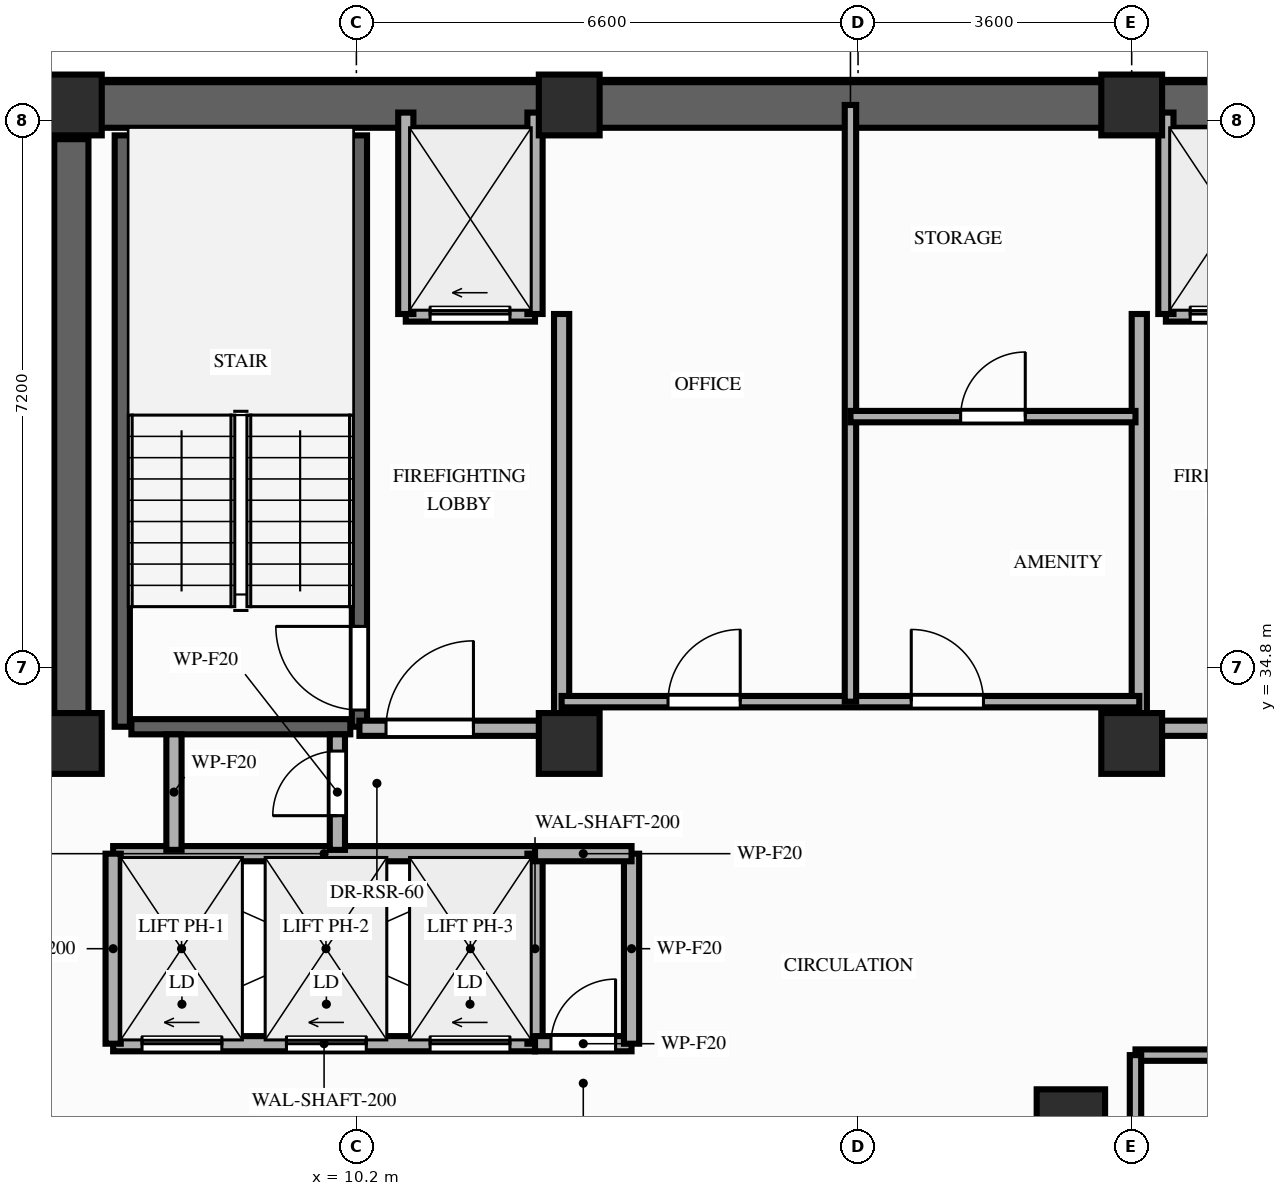
"""IFC4 building model, lengths in metres.
Left out: names, types, materials, properties, quantities, classifications, styles, units other than length and angle.
Written with IfcOpenShell. Run it as: python <this file> out.ifc"""

import sys

from ifc_helpers import new_model, si_unit, direction, frame, frame_2d, origin, origin_2d, place, context, subcontext, project, spatial, rectangle, extrude, element, fill, save


model = new_model("IFC4")
c1 = context("Model", 3, precision=1e-05, world=origin(), true_north=direction((0.0, 1.0)))
c2 = subcontext(c1, "Body", "Model", "MODEL_VIEW")
j1 = project(units=[si_unit("LENGTHUNIT", "METRE"), si_unit("PLANEANGLEUNIT", "RADIAN")], contexts=[c1])
p1 = place(None, origin())
s1 = spatial("IfcSite", under=j1, at=p1, CompositionType="ELEMENT")
p2 = place(p1, origin())
s2 = spatial("IfcBuilding", under=s1, at=p2, CompositionType="ELEMENT")
p3 = place(p2, frame((0.0, 0.0, 198.4)))
s3 = spatial("IfcBuildingStorey", under=s2, at=p3, CompositionType="ELEMENT", Elevation=198.4)
for number, where, z_axis, x_axis in (
    (1, (6.45, 33.8, 0.0), (0.0, 0.0, 1.0), (1.0, 0.0, 0.0)),
    (2, (13.0, 33.8, 0.0), (0.0, 0.0, 1.0), (1.0, 0.0, 0.0)),
    (3, (20.4, 33.8, 0.0), (0.0, 0.0, 1.0), (1.0, 0.0, 0.0)),
    (4, (6.45, 42.2, 0.0), (0.0, 0.0, 1.0), (1.0, 0.0, 0.0)),
    (5, (13.0, 42.2, 0.0), (0.0, 0.0, 1.0), (1.0, 0.0, 0.0)),
    (6, (20.4, 42.2, 0.0), (0.0, 0.0, 1.0), (1.0, 0.0, 0.0)),
):
    element("IfcColumn", number, at=place(p3, frame(where, z_axis=z_axis, x_axis=x_axis)), inside=s3, PredefinedType="COLUMN", context=c2, shape_type="SweptSolid", body=[
        extrude(rectangle(XDim=0.8, YDim=0.8, at=origin_2d()), origin(), (0.0, 0.0, 1.0), 3.2),
    ])
p4 = place(p3, frame((19.6, 28.8, 0.0), z_axis=(0.0, 0.0, 1.0), x_axis=(1.0, 0.0, 0.0)))
e7 = element("IfcColumn", 7, at=p4, inside=s3, PredefinedType="COLUMN", context=c2, shape_type="SweptSolid", body=[
    extrude(rectangle(XDim=0.9, YDim=0.9, at=origin_2d()), origin(), (0.0, 0.0, 1.0), 3.2),
])
p5 = place(p3, frame((6.45, 42.2, 0.0), z_axis=(0.0, 0.0, 1.0), x_axis=(1.0, 0.0, 0.0)))
e8 = element("IfcWall", 8, at=p5, inside=s3, PredefinedType="SHEAR", context=c2, shape_type="SweptSolid", body=[
    extrude(rectangle(XDim=20.45, YDim=0.6, at=frame_2d((10.225, 0.0))), origin(), (0.0, 0.0, 1.0), 3.02),
])
p6 = place(p3, frame((6.45, 33.8, 0.0), z_axis=(0.0, 0.0, 1.0), x_axis=(0.0, 1.0, 0.0)))
e9 = element("IfcWall", 9, at=p6, inside=s3, PredefinedType="SHEAR", context=c2, shape_type="SweptSolid", body=[
    extrude(rectangle(XDim=7.95, YDim=0.45, at=frame_2d((3.975, 0.0))), origin(), (0.0, 0.0, 1.0), 3.02),
])
p7 = place(p3, frame((7.12, 34.02, 0.0), z_axis=(0.0, 0.0, 1.0), x_axis=(0.0, 1.0, 0.0)))
e10 = element("IfcWall", 10, at=p7, inside=s3, PredefinedType="SHEAR", context=c2, shape_type="SweptSolid", body=[
    extrude(rectangle(XDim=7.78, YDim=0.2, at=frame_2d((3.89, 0.0))), origin(), (0.0, 0.0, 1.0), 3.02),
])
p8 = place(p3, frame((10.24, 34.02, 0.0), z_axis=(0.0, 0.0, 1.0), x_axis=(0.0, 1.0, 0.0)))
e11 = element("IfcWall", 11, at=p8, inside=s3, PredefinedType="SHEAR", context=c2, shape_type="SweptSolid", body=[
    extrude(rectangle(XDim=7.78, YDim=0.2, at=frame_2d((3.89, 0.0))), origin(), (0.0, 0.0, 1.0), 3.02),
])
p9 = place(p8, frame((0.22, 0.0, 0.0)))
e12 = element("IfcOpeningElement", 12, at=p9, cuts=e11, PredefinedType="OPENING", context=c2, shape_type="SweptSolid", body=[
    extrude(rectangle(XDim=1.1, YDim=2.15, at=frame_2d((0.55, 1.075))), frame((0.0, 0.11, 0.0), z_axis=(0.0, -1.0, 0.0), x_axis=(1.0, 0.0, 0.0)), (0.0, 0.0, 1.0), 0.22),
])
p10 = place(p3, frame((7.24, 34.02, 0.0), z_axis=(0.0, 0.0, 1.0), x_axis=(1.0, 0.0, 0.0)))
e13 = element("IfcWall", 13, at=p10, inside=s3, PredefinedType="SHEAR", context=c2, shape_type="SweptSolid", body=[
    extrude(rectangle(XDim=2.88, YDim=0.2, at=frame_2d((1.44, 0.0))), origin(), (0.0, 0.0, 1.0), 3.02),
])
p11 = place(p3, frame((7.0, 29.85, 0.0), z_axis=(0.0, 0.0, 1.0), x_axis=(1.0, 0.0, 0.0)))
e14 = element("IfcWall", 14, at=p11, inside=s3, PredefinedType="MOVABLE", context=c2, shape_type="SweptSolid", body=[
    extrude(rectangle(XDim=5.55, YDim=0.2, at=frame_2d((2.775, 0.0))), origin(), (0.0, 0.0, 1.0), 3.02),
])
p12 = place(p11, frame((0.38, 0.0, 0.0)))
e15 = element("IfcOpeningElement", 15, at=p12, cuts=e14, PredefinedType="OPENING", context=c2, shape_type="SweptSolid", body=[
    extrude(rectangle(XDim=1.05, YDim=2.15, at=frame_2d((0.525, 1.075))), frame((0.0, 0.11, 0.0), z_axis=(0.0, -1.0, 0.0), x_axis=(1.0, 0.0, 0.0)), (0.0, 0.0, 1.0), 0.22),
])
p13 = place(p11, frame((2.28, 0.0, 0.0)))
e16 = element("IfcOpeningElement", 16, at=p13, cuts=e14, PredefinedType="OPENING", context=c2, shape_type="SweptSolid", body=[
    extrude(rectangle(XDim=1.05, YDim=2.15, at=frame_2d((0.525, 1.075))), frame((0.0, 0.11, 0.0), z_axis=(0.0, -1.0, 0.0), x_axis=(1.0, 0.0, 0.0)), (0.0, 0.0, 1.0), 0.22),
])
p14 = place(p11, frame((4.17, 0.0, 0.0)))
e17 = element("IfcOpeningElement", 17, at=p14, cuts=e14, PredefinedType="OPENING", context=c2, shape_type="SweptSolid", body=[
    extrude(rectangle(XDim=1.05, YDim=2.15, at=frame_2d((0.525, 1.075))), frame((0.0, 0.11, 0.0), z_axis=(0.0, -1.0, 0.0), x_axis=(1.0, 0.0, 0.0)), (0.0, 0.0, 1.0), 0.22),
])
p15 = place(p3, frame((7.0, 32.35, 0.0), z_axis=(0.0, 0.0, 1.0), x_axis=(1.0, 0.0, 0.0)))
e18 = element("IfcWall", 18, at=p15, inside=s3, PredefinedType="MOVABLE", context=c2, shape_type="SweptSolid", body=[
    extrude(rectangle(XDim=5.55, YDim=0.2, at=frame_2d((2.775, 0.0))), origin(), (0.0, 0.0, 1.0), 3.02),
])
for number, where, z_axis, x_axis in (
    (19, (7.0, 29.85, 0.0), (0.0, 0.0, 1.0), (0.0, 1.0, 0.0)),
    (20, (12.55, 29.85, 0.0), (0.0, 0.0, 1.0), (0.0, 1.0, 0.0)),
):
    element("IfcWall", number, at=place(p3, frame(where, z_axis=z_axis, x_axis=x_axis)), inside=s3, PredefinedType="MOVABLE", context=c2, shape_type="SweptSolid", body=[
        extrude(rectangle(XDim=2.5, YDim=0.2, at=frame_2d((1.25, 0.0))), origin(), (0.0, 0.0, 1.0), 3.02),
    ])
p16 = place(p3, frame((10.85, 39.45, 0.0), z_axis=(0.0, 0.0, 1.0), x_axis=(1.0, 0.0, 0.0)))
e21 = element("IfcWall", 21, at=p16, inside=s3, PredefinedType="MOVABLE", context=c2, shape_type="SweptSolid", body=[
    extrude(rectangle(XDim=1.7, YDim=0.2, at=frame_2d((0.85, 0.0))), origin(), (0.0, 0.0, 1.0), 3.02),
])
p17 = place(p16, frame((0.32, 0.0, 0.0)))
e22 = element("IfcOpeningElement", 22, at=p17, cuts=e21, PredefinedType="OPENING", context=c2, shape_type="SweptSolid", body=[
    extrude(rectangle(XDim=1.05, YDim=2.15, at=frame_2d((0.525, 1.075))), frame((0.0, 0.11, 0.0), z_axis=(0.0, -1.0, 0.0), x_axis=(1.0, 0.0, 0.0)), (0.0, 0.0, 1.0), 0.22),
])
p18 = place(p3, frame((20.85, 39.45, 0.0), z_axis=(0.0, 0.0, 1.0), x_axis=(1.0, 0.0, 0.0)))
e23 = element("IfcWall", 23, at=p18, inside=s3, PredefinedType="MOVABLE", context=c2, shape_type="SweptSolid", body=[
    extrude(rectangle(XDim=1.7, YDim=0.2, at=frame_2d((0.85, 0.0))), origin(), (0.0, 0.0, 1.0), 3.02),
])
p19 = place(p18, frame((0.32, 0.0, 0.0)))
e24 = element("IfcOpeningElement", 24, at=p19, cuts=e23, PredefinedType="OPENING", context=c2, shape_type="SweptSolid", body=[
    extrude(rectangle(XDim=1.05, YDim=2.15, at=frame_2d((0.525, 1.075))), frame((0.0, 0.11, 0.0), z_axis=(0.0, -1.0, 0.0), x_axis=(1.0, 0.0, 0.0)), (0.0, 0.0, 1.0), 0.22),
])
for number, where, z_axis, x_axis in (
    (25, (10.85, 39.45, 0.0), (0.0, 0.0, 1.0), (0.0, 1.0, 0.0)),
    (26, (12.55, 39.45, 0.0), (0.0, 0.0, 1.0), (0.0, 1.0, 0.0)),
):
    element("IfcWall", number, at=place(p3, frame(where, z_axis=z_axis, x_axis=x_axis)), inside=s3, PredefinedType="MOVABLE", context=c2, shape_type="SweptSolid", body=[
        extrude(rectangle(XDim=2.65, YDim=0.2, at=frame_2d((1.325, 0.0))), origin(), (0.0, 0.0, 1.0), 2.51),
    ])
p20 = place(p3, frame((12.9, 34.0, 0.0), z_axis=(0.0, 0.0, 1.0), x_axis=(0.0, 1.0, 0.0)))
e27 = element("IfcWall", 27, at=p20, inside=s3, PredefinedType="PARTITIONING", context=c2, shape_type="SweptSolid", body=[
    extrude(rectangle(XDim=5.45, YDim=0.2, at=frame_2d((2.725, 0.0))), origin(), (0.0, 0.0, 1.0), 2.51),
])
p21 = place(p3, frame((10.24, 34.0, 0.0), z_axis=(0.0, 0.0, 1.0), x_axis=(1.0, 0.0, 0.0)))
e28 = element("IfcWall", 28, at=p21, inside=s3, PredefinedType="PARTITIONING", context=c2, shape_type="SweptSolid", body=[
    extrude(rectangle(XDim=2.66, YDim=0.2, at=frame_2d((1.33, 0.0))), origin(), (0.0, 0.0, 1.0), 2.51),
])
p22 = place(p21, frame((0.35, 0.0, 0.0)))
e29 = element("IfcOpeningElement", 29, at=p22, cuts=e28, PredefinedType="OPENING", context=c2, shape_type="SweptSolid", body=[
    extrude(rectangle(XDim=1.15, YDim=2.15, at=frame_2d((0.575, 1.075))), frame((0.0, 0.11, 0.0), z_axis=(0.0, -1.0, 0.0), x_axis=(1.0, 0.0, 0.0)), (0.0, 0.0, 1.0), 0.22),
])
p23 = place(p3, frame((20.85, 39.45, 0.0), z_axis=(0.0, 0.0, 1.0), x_axis=(0.0, 1.0, 0.0)))
e30 = element("IfcWall", 30, at=p23, inside=s3, PredefinedType="MOVABLE", context=c2, shape_type="SweptSolid", body=[
    extrude(rectangle(XDim=2.65, YDim=0.2, at=frame_2d((1.325, 0.0))), origin(), (0.0, 0.0, 1.0), 2.51),
])
p24 = place(p3, frame((20.5, 34.0, 0.0), z_axis=(0.0, 0.0, 1.0), x_axis=(0.0, 1.0, 0.0)))
e31 = element("IfcWall", 31, at=p24, inside=s3, PredefinedType="PARTITIONING", context=c2, shape_type="SweptSolid", body=[
    extrude(rectangle(XDim=5.45, YDim=0.2, at=frame_2d((2.725, 0.0))), origin(), (0.0, 0.0, 1.0), 2.51),
])
p25 = place(p3, frame((20.5, 34.0, 0.0), z_axis=(0.0, 0.0, 1.0), x_axis=(1.0, 0.0, 0.0)))
e32 = element("IfcWall", 32, at=p25, inside=s3, PredefinedType="PARTITIONING", context=c2, shape_type="SweptSolid", body=[
    extrude(rectangle(XDim=2.6, YDim=0.2, at=frame_2d((1.3, 0.0))), origin(), (0.0, 0.0, 1.0), 2.51),
])
p26 = place(p25, frame((1.05, 0.0, 0.0)))
e33 = element("IfcOpeningElement", 33, at=p26, cuts=e32, PredefinedType="OPENING", context=c2, shape_type="SweptSolid", body=[
    extrude(rectangle(XDim=1.15, YDim=2.15, at=frame_2d((0.575, 1.075))), frame((0.0, 0.11, 0.0), z_axis=(0.0, -1.0, 0.0), x_axis=(1.0, 0.0, 0.0)), (0.0, 0.0, 1.0), 0.22),
])
p27 = place(p3, frame((12.55, 29.85, 0.0), z_axis=(0.0, 0.0, 1.0), x_axis=(1.0, 0.0, 0.0)))
e34 = element("IfcWall", 34, at=p27, inside=s3, PredefinedType="PARTITIONING", context=c2, shape_type="SweptSolid", body=[
    extrude(rectangle(XDim=1.27, YDim=0.2, at=frame_2d((0.635, 0.0))), origin(), (0.0, 0.0, 1.0), 3.02),
])
p28 = place(p27, frame((0.21, 0.0, 0.0)))
e35 = element("IfcOpeningElement", 35, at=p28, cuts=e34, PredefinedType="OPENING", context=c2, shape_type="SweptSolid", body=[
    extrude(rectangle(XDim=0.85, YDim=2.05, at=frame_2d((0.425, 1.025))), frame((0.0, 0.11, 0.0), z_axis=(0.0, -1.0, 0.0), x_axis=(1.0, 0.0, 0.0)), (0.0, 0.0, 1.0), 0.22),
])
p29 = place(p3, frame((13.82, 29.85, 0.0), z_axis=(0.0, 0.0, 1.0), x_axis=(0.0, 1.0, 0.0)))
e36 = element("IfcWall", 36, at=p29, inside=s3, PredefinedType="PARTITIONING", context=c2, shape_type="SweptSolid", body=[
    extrude(rectangle(XDim=2.5, YDim=0.2, at=frame_2d((1.25, 0.0))), origin(), (0.0, 0.0, 1.0), 3.02),
])
p30 = place(p3, frame((12.55, 32.35, 0.0), z_axis=(0.0, 0.0, 1.0), x_axis=(1.0, 0.0, 0.0)))
e37 = element("IfcWall", 37, at=p30, inside=s3, PredefinedType="PARTITIONING", context=c2, shape_type="SweptSolid", body=[
    extrude(rectangle(XDim=1.27, YDim=0.2, at=frame_2d((0.635, 0.0))), origin(), (0.0, 0.0, 1.0), 3.02),
])
p31 = place(p3, frame((7.8, 32.4, 0.0), z_axis=(0.0, 0.0, 1.0), x_axis=(0.0, 1.0, 0.0)))
e38 = element("IfcWall", 38, at=p31, inside=s3, PredefinedType="PARTITIONING", context=c2, shape_type="SweptSolid", body=[
    extrude(rectangle(XDim=1.52, YDim=0.2, at=frame_2d((0.76, 0.0))), origin(), (0.0, 0.0, 1.0), 2.51),
])
p32 = place(p3, frame((9.95, 32.4, 0.0), z_axis=(0.0, 0.0, 1.0), x_axis=(0.0, 1.0, 0.0)))
e39 = element("IfcWall", 39, at=p32, inside=s3, PredefinedType="PARTITIONING", context=c2, shape_type="SweptSolid", body=[
    extrude(rectangle(XDim=1.52, YDim=0.2, at=frame_2d((0.76, 0.0))), origin(), (0.0, 0.0, 1.0), 2.51),
])
p33 = place(p32, frame((0.45, 0.0, 0.0)))
e40 = element("IfcOpeningElement", 40, at=p33, cuts=e39, PredefinedType="OPENING", context=c2, shape_type="SweptSolid", body=[
    extrude(rectangle(XDim=0.85, YDim=2.05, at=frame_2d((0.425, 1.025))), frame((0.0, 0.11, 0.0), z_axis=(0.0, -1.0, 0.0), x_axis=(1.0, 0.0, 0.0)), (0.0, 0.0, 1.0), 0.22),
])
p34 = place(p3, frame((12.9, 34.35, 0.0), z_axis=(0.0, 0.0, 1.0), x_axis=(1.0, 0.0, 0.0)))
e41 = element("IfcWall", 41, at=p34, inside=s3, PredefinedType="PARTITIONING", context=c2, shape_type="SweptSolid", body=[
    extrude(rectangle(XDim=7.6, YDim=0.15, at=frame_2d((3.8, 0.0))), origin(), (0.0, 0.0, 1.0), 3.02),
])
p35 = place(p34, frame((1.4, 0.0, 0.0)))
e42 = element("IfcOpeningElement", 42, at=p35, cuts=e41, PredefinedType="OPENING", context=c2, shape_type="SweptSolid", body=[
    extrude(rectangle(XDim=0.95, YDim=2.15, at=frame_2d((0.475, 1.075))), frame((0.0, 0.085, 0.0), z_axis=(0.0, -1.0, 0.0), x_axis=(1.0, 0.0, 0.0)), (0.0, 0.0, 1.0), 0.17),
])
p36 = place(p34, frame((4.6, 0.0, 0.0)))
e43 = element("IfcOpeningElement", 43, at=p36, cuts=e41, PredefinedType="OPENING", context=c2, shape_type="SweptSolid", body=[
    extrude(rectangle(XDim=0.95, YDim=2.15, at=frame_2d((0.475, 1.075))), frame((0.0, 0.085, 0.0), z_axis=(0.0, -1.0, 0.0), x_axis=(1.0, 0.0, 0.0)), (0.0, 0.0, 1.0), 0.17),
])
p37 = place(p3, frame((16.7, 34.35, 0.0), z_axis=(0.0, 0.0, 1.0), x_axis=(0.0, 1.0, 0.0)))
e44 = element("IfcWall", 44, at=p37, inside=s3, PredefinedType="PARTITIONING", context=c2, shape_type="SweptSolid", body=[
    extrude(rectangle(XDim=7.85, YDim=0.15, at=frame_2d((3.925, 0.0))), origin(), (0.0, 0.0, 1.0), 2.51),
])
p38 = place(p3, frame((16.7, 38.1, 0.0), z_axis=(0.0, 0.0, 1.0), x_axis=(1.0, 0.0, 0.0)))
e45 = element("IfcWall", 45, at=p38, inside=s3, PredefinedType="PARTITIONING", context=c2, shape_type="SweptSolid", body=[
    extrude(rectangle(XDim=3.75, YDim=0.15, at=frame_2d((1.875, 0.0))), origin(), (0.0, 0.0, 1.0), 3.02),
])
p39 = place(p38, frame((1.45, 0.0, 0.0)))
e46 = element("IfcOpeningElement", 46, at=p39, cuts=e45, PredefinedType="OPENING", context=c2, shape_type="SweptSolid", body=[
    extrude(rectangle(XDim=0.85, YDim=2.05, at=frame_2d((0.425, 1.025))), frame((0.0, 0.085, 0.0), z_axis=(0.0, -1.0, 0.0), x_axis=(1.0, 0.0, 0.0)), (0.0, 0.0, 1.0), 0.17),
])
p40 = place(p3, frame((20.45, 29.7, 0.0), z_axis=(0.0, 0.0, 1.0), x_axis=(1.0, 0.0, 0.0)))
e47 = element("IfcWall", 47, at=p40, inside=s3, PredefinedType="PARTITIONING", context=c2, shape_type="SweptSolid", body=[
    extrude(rectangle(XDim=6.7, YDim=0.15, at=frame_2d((3.35, 0.0))), origin(), (0.0, 0.0, 1.0), 3.02),
])
p41 = place(p40, frame((2.8, 0.0, 0.0)))
e48 = element("IfcOpeningElement", 48, at=p41, cuts=e47, PredefinedType="OPENING", context=c2, shape_type="SweptSolid", body=[
    extrude(rectangle(XDim=0.95, YDim=2.15, at=frame_2d((0.475, 1.075))), frame((0.0, 0.085, 0.0), z_axis=(0.0, -1.0, 0.0), x_axis=(1.0, 0.0, 0.0)), (0.0, 0.0, 1.0), 0.17),
])
p42 = place(p3, frame((20.45, 26.75, 0.0), z_axis=(0.0, 0.0, 1.0), x_axis=(0.0, 1.0, 0.0)))
e49 = element("IfcWall", 49, at=p42, inside=s3, PredefinedType="PARTITIONING", context=c2, shape_type="SweptSolid", body=[
    extrude(rectangle(XDim=2.95, YDim=0.15, at=frame_2d((1.475, 0.0))), origin(), (0.0, 0.0, 1.0), 2.51),
])
p43 = place(p9, origin())
e50 = element("IfcDoor", 50, at=p43, inside=s3, OperationType="SINGLE_SWING_RIGHT", PredefinedType="DOOR", context=c2, shape_type="SweptSolid", body=[
    extrude(rectangle(XDim=1.1, YDim=2.15, at=frame_2d((0.55, 1.075))), frame((0.0, 0.025, 0.0), z_axis=(0.0, -1.0, 0.0), x_axis=(1.0, 0.0, 0.0)), (0.0, 0.0, 1.0), 0.05),
])
fill(e12, e50)
p44 = place(p12, origin())
e51 = element("IfcDoor", 51, at=p44, inside=s3, OperationType="SLIDING_TO_LEFT", PredefinedType="DOOR", context=c2, shape_type="SweptSolid", body=[
    extrude(rectangle(XDim=1.05, YDim=2.15, at=frame_2d((0.525, 1.075))), frame((0.0, 0.025, 0.0), z_axis=(0.0, -1.0, 0.0), x_axis=(1.0, 0.0, 0.0)), (0.0, 0.0, 1.0), 0.05),
])
fill(e15, e51)
p45 = place(p13, origin())
e52 = element("IfcDoor", 52, at=p45, inside=s3, OperationType="SLIDING_TO_LEFT", PredefinedType="DOOR", context=c2, shape_type="SweptSolid", body=[
    extrude(rectangle(XDim=1.05, YDim=2.15, at=frame_2d((0.525, 1.075))), frame((0.0, 0.025, 0.0), z_axis=(0.0, -1.0, 0.0), x_axis=(1.0, 0.0, 0.0)), (0.0, 0.0, 1.0), 0.05),
])
fill(e16, e52)
p46 = place(p14, origin())
e53 = element("IfcDoor", 53, at=p46, inside=s3, OperationType="SLIDING_TO_LEFT", PredefinedType="DOOR", context=c2, shape_type="SweptSolid", body=[
    extrude(rectangle(XDim=1.05, YDim=2.15, at=frame_2d((0.525, 1.075))), frame((0.0, 0.025, 0.0), z_axis=(0.0, -1.0, 0.0), x_axis=(1.0, 0.0, 0.0)), (0.0, 0.0, 1.0), 0.05),
])
fill(e17, e53)
p47 = place(p17, origin())
e54 = element("IfcDoor", 54, at=p47, inside=s3, OperationType="SLIDING_TO_LEFT", PredefinedType="DOOR", context=c2, shape_type="SweptSolid", body=[
    extrude(rectangle(XDim=1.05, YDim=2.15, at=frame_2d((0.525, 1.075))), frame((0.0, 0.025, 0.0), z_axis=(0.0, -1.0, 0.0), x_axis=(1.0, 0.0, 0.0)), (0.0, 0.0, 1.0), 0.05),
])
fill(e22, e54)
p48 = place(p19, origin())
e55 = element("IfcDoor", 55, at=p48, inside=s3, OperationType="SLIDING_TO_LEFT", PredefinedType="DOOR", context=c2, shape_type="SweptSolid", body=[
    extrude(rectangle(XDim=1.05, YDim=2.15, at=frame_2d((0.525, 1.075))), frame((0.0, 0.025, 0.0), z_axis=(0.0, -1.0, 0.0), x_axis=(1.0, 0.0, 0.0)), (0.0, 0.0, 1.0), 0.05),
])
fill(e24, e55)
p49 = place(p22, origin())
e56 = element("IfcDoor", 56, at=p49, inside=s3, OperationType="SINGLE_SWING_RIGHT", PredefinedType="DOOR", context=c2, shape_type="SweptSolid", body=[
    extrude(rectangle(XDim=1.15, YDim=2.15, at=frame_2d((0.575, 1.075))), frame((0.0, 0.025, 0.0), z_axis=(0.0, -1.0, 0.0), x_axis=(1.0, 0.0, 0.0)), (0.0, 0.0, 1.0), 0.05),
])
fill(e29, e56)
p50 = place(p28, origin())
e57 = element("IfcDoor", 57, at=p50, inside=s3, OperationType="SINGLE_SWING_RIGHT", PredefinedType="DOOR", context=c2, shape_type="SweptSolid", body=[
    extrude(rectangle(XDim=0.85, YDim=2.05, at=frame_2d((0.425, 1.025))), frame((0.0, 0.025, 0.0), z_axis=(0.0, -1.0, 0.0), x_axis=(1.0, 0.0, 0.0)), (0.0, 0.0, 1.0), 0.05),
])
fill(e35, e57)
p51 = place(p33, origin())
e58 = element("IfcDoor", 58, at=p51, inside=s3, OperationType="SINGLE_SWING_LEFT", PredefinedType="DOOR", context=c2, shape_type="SweptSolid", body=[
    extrude(rectangle(XDim=0.85, YDim=2.05, at=frame_2d((0.425, 1.025))), frame((0.0, 0.025, 0.0), z_axis=(0.0, -1.0, 0.0), x_axis=(1.0, 0.0, 0.0)), (0.0, 0.0, 1.0), 0.05),
])
fill(e40, e58)
p52 = place(p35, origin())
e59 = element("IfcDoor", 59, at=p52, inside=s3, OperationType="SINGLE_SWING_RIGHT", PredefinedType="DOOR", context=c2, shape_type="SweptSolid", body=[
    extrude(rectangle(XDim=0.95, YDim=2.15, at=frame_2d((0.475, 1.075))), frame((0.0, 0.025, 0.0), z_axis=(0.0, -1.0, 0.0), x_axis=(1.0, 0.0, 0.0)), (0.0, 0.0, 1.0), 0.05),
])
fill(e42, e59)
p53 = place(p36, origin())
e60 = element("IfcDoor", 60, at=p53, inside=s3, OperationType="SINGLE_SWING_LEFT", PredefinedType="DOOR", context=c2, shape_type="SweptSolid", body=[
    extrude(rectangle(XDim=0.95, YDim=2.15, at=frame_2d((0.475, 1.075))), frame((0.0, 0.025, 0.0), z_axis=(0.0, -1.0, 0.0), x_axis=(1.0, 0.0, 0.0)), (0.0, 0.0, 1.0), 0.05),
])
fill(e43, e60)
p54 = place(p39, origin())
e61 = element("IfcDoor", 61, at=p54, inside=s3, OperationType="SINGLE_SWING_RIGHT", PredefinedType="DOOR", context=c2, shape_type="SweptSolid", body=[
    extrude(rectangle(XDim=0.85, YDim=2.05, at=frame_2d((0.425, 1.025))), frame((0.0, 0.025, 0.0), z_axis=(0.0, -1.0, 0.0), x_axis=(1.0, 0.0, 0.0)), (0.0, 0.0, 1.0), 0.05),
])
fill(e46, e61)
save(model, sys.argv[1])
